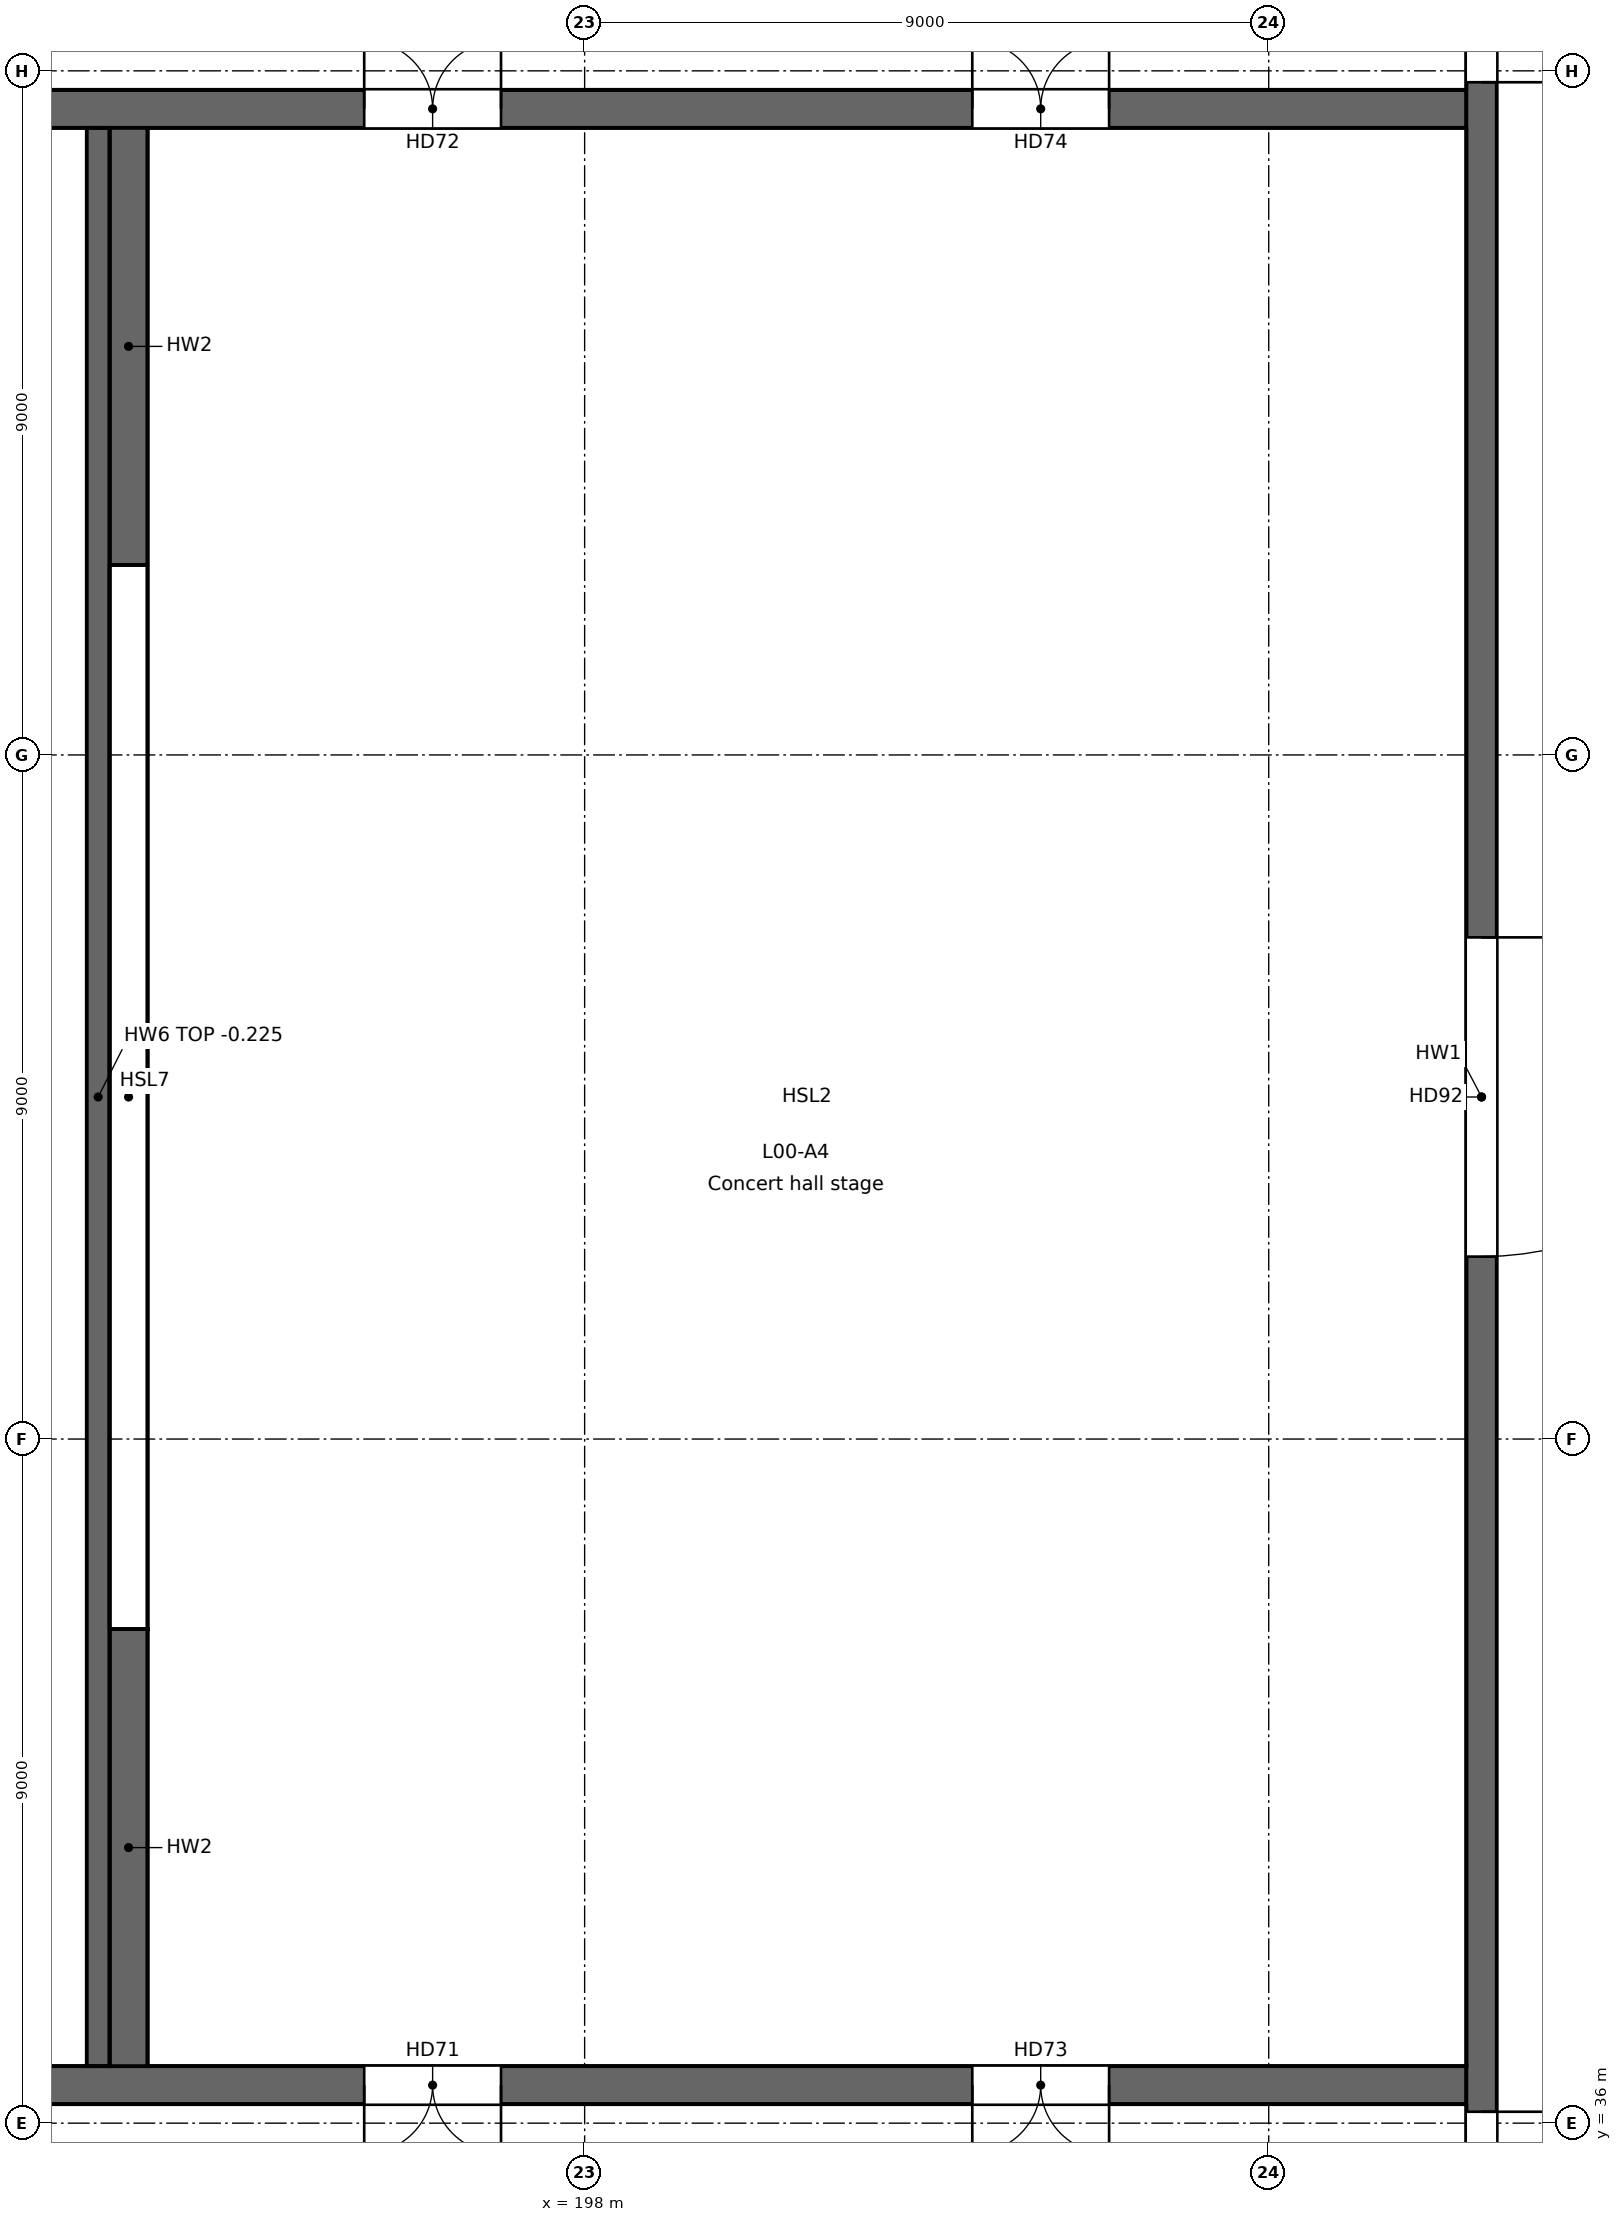
"""IFC4 building model, lengths in metres.
Left out: names, types, materials, properties, quantities, classifications, styles, units other than length and angle.
Written with IfcOpenShell. Run it as: python <this file> out.ifc"""

import sys

from ifc_helpers import new_model, si_unit, direction, frame, frame_2d, origin, place, context, subcontext, project, spatial, rectangle, extrude, element, fill, save


model = new_model("IFC4")
c1 = context("Model", 3, precision=1e-05, world=origin(), true_north=direction((0.0, 1.0)))
c2 = subcontext(c1, "Body", "Model", "MODEL_VIEW")
j1 = project(units=[si_unit("LENGTHUNIT", "METRE"), si_unit("PLANEANGLEUNIT", "RADIAN")], contexts=[c1])
p1 = place(None, origin())
s1 = spatial("IfcSite", under=j1, at=p1, CompositionType="ELEMENT")
p2 = place(p1, origin())
s2 = spatial("IfcBuilding", under=s1, at=p2, CompositionType="ELEMENT")
p3 = place(p2, origin())
s3 = spatial("IfcBuildingStorey", under=s2, at=p3, CompositionType="ELEMENT", Elevation=0.0)
p4 = place(p3, frame((209.6, 36.5, -1.8), z_axis=(0.0, 0.0, 1.0), x_axis=(-1.0, 0.0, 0.0)))
e1 = element("IfcWall", 1, at=p4, inside=s3, PredefinedType="SOLIDWALL", context=c2, shape_type="SweptSolid", body=[
    extrude(rectangle(XDim=47.35, YDim=0.5, at=frame_2d((23.675, 0.0))), origin(), (0.0, 0.0, 1.0), 7.45),
])
p5 = place(p4, frame((40.7, 0.0, 1.8)))
e2 = element("IfcOpeningElement", 2, at=p5, cuts=e1, PredefinedType="OPENING", context=c2, shape_type="SweptSolid", body=[
    extrude(rectangle(XDim=1.8, YDim=2.4, at=frame_2d((0.9, 1.2))), frame((0.0, 0.25, 0.0), z_axis=(0.0, -1.0, 0.0), x_axis=(1.0, 0.0, 0.0)), (0.0, 0.0, 1.0), 0.5),
])
p6 = place(p4, frame((37.2, 0.0, 1.8)))
e3 = element("IfcOpeningElement", 3, at=p6, cuts=e1, PredefinedType="OPENING", context=c2, shape_type="SweptSolid", body=[
    extrude(rectangle(XDim=1.8, YDim=2.4, at=frame_2d((0.9, 1.2))), frame((0.0, 0.25, 0.0), z_axis=(0.0, -1.0, 0.0), x_axis=(1.0, 0.0, 0.0)), (0.0, 0.0, 1.0), 0.5),
])
p7 = place(p4, frame((33.7, 0.0, 1.8)))
e4 = element("IfcOpeningElement", 4, at=p7, cuts=e1, PredefinedType="OPENING", context=c2, shape_type="SweptSolid", body=[
    extrude(rectangle(XDim=1.8, YDim=2.4, at=frame_2d((0.9, 1.2))), frame((0.0, 0.25, 0.0), z_axis=(0.0, -1.0, 0.0), x_axis=(1.0, 0.0, 0.0)), (0.0, 0.0, 1.0), 0.5),
])
p8 = place(p4, frame((12.7, 0.0, 1.8)))
e5 = element("IfcOpeningElement", 5, at=p8, cuts=e1, PredefinedType="OPENING", context=c2, shape_type="SweptSolid", body=[
    extrude(rectangle(XDim=1.8, YDim=2.1, at=frame_2d((0.9, 1.05))), frame((0.0, 0.25, 0.0), z_axis=(0.0, -1.0, 0.0), x_axis=(1.0, 0.0, 0.0)), (0.0, 0.0, 1.0), 0.5),
])
p9 = place(p4, frame((4.7, 0.0, 1.8)))
e6 = element("IfcOpeningElement", 6, at=p9, cuts=e1, PredefinedType="OPENING", context=c2, shape_type="SweptSolid", body=[
    extrude(rectangle(XDim=1.8, YDim=2.1, at=frame_2d((0.9, 1.05))), frame((0.0, 0.25, 0.0), z_axis=(0.0, -1.0, 0.0), x_axis=(1.0, 0.0, 0.0)), (0.0, 0.0, 1.0), 0.5),
])
p10 = place(p3, frame((162.25, 62.5, -1.8), z_axis=(0.0, 0.0, 1.0), x_axis=(1.0, 0.0, 0.0)))
e7 = element("IfcWall", 7, at=p10, inside=s3, PredefinedType="SOLIDWALL", context=c2, shape_type="SweptSolid", body=[
    extrude(rectangle(XDim=47.35, YDim=0.5, at=frame_2d((23.675, 0.0))), origin(), (0.0, 0.0, 1.0), 7.45),
])
p11 = place(p10, frame((4.85, 0.0, 1.8)))
e8 = element("IfcOpeningElement", 8, at=p11, cuts=e7, PredefinedType="OPENING", context=c2, shape_type="SweptSolid", body=[
    extrude(rectangle(XDim=1.8, YDim=2.4, at=frame_2d((0.9, 1.2))), frame((0.0, 0.25, 0.0), z_axis=(0.0, -1.0, 0.0), x_axis=(1.0, 0.0, 0.0)), (0.0, 0.0, 1.0), 0.5),
])
p12 = place(p10, frame((8.35, 0.0, 1.8)))
e9 = element("IfcOpeningElement", 9, at=p12, cuts=e7, PredefinedType="OPENING", context=c2, shape_type="SweptSolid", body=[
    extrude(rectangle(XDim=1.8, YDim=2.4, at=frame_2d((0.9, 1.2))), frame((0.0, 0.25, 0.0), z_axis=(0.0, -1.0, 0.0), x_axis=(1.0, 0.0, 0.0)), (0.0, 0.0, 1.0), 0.5),
])
p13 = place(p10, frame((11.85, 0.0, 1.8)))
e10 = element("IfcOpeningElement", 10, at=p13, cuts=e7, PredefinedType="OPENING", context=c2, shape_type="SweptSolid", body=[
    extrude(rectangle(XDim=1.8, YDim=2.4, at=frame_2d((0.9, 1.2))), frame((0.0, 0.25, 0.0), z_axis=(0.0, -1.0, 0.0), x_axis=(1.0, 0.0, 0.0)), (0.0, 0.0, 1.0), 0.5),
])
p14 = place(p10, frame((32.85, 0.0, 1.8)))
e11 = element("IfcOpeningElement", 11, at=p14, cuts=e7, PredefinedType="OPENING", context=c2, shape_type="SweptSolid", body=[
    extrude(rectangle(XDim=1.8, YDim=2.1, at=frame_2d((0.9, 1.05))), frame((0.0, 0.25, 0.0), z_axis=(0.0, -1.0, 0.0), x_axis=(1.0, 0.0, 0.0)), (0.0, 0.0, 1.0), 0.5),
])
p15 = place(p10, frame((40.85, 0.0, 1.8)))
e12 = element("IfcOpeningElement", 12, at=p15, cuts=e7, PredefinedType="OPENING", context=c2, shape_type="SweptSolid", body=[
    extrude(rectangle(XDim=1.8, YDim=2.1, at=frame_2d((0.9, 1.05))), frame((0.0, 0.25, 0.0), z_axis=(0.0, -1.0, 0.0), x_axis=(1.0, 0.0, 0.0)), (0.0, 0.0, 1.0), 0.5),
])
for number, where, z_axis, x_axis in (
    (13, (192.0, 36.75, -1.8), (0.0, 0.0, 1.0), (0.0, 1.0, 0.0)),
    (14, (192.0, 56.5, -1.8), (0.0, 0.0, 1.0), (0.0, 1.0, 0.0)),
):
    element("IfcWall", number, at=place(p3, frame(where, z_axis=z_axis, x_axis=x_axis)), inside=s3, PredefinedType="SOLIDWALL", context=c2, shape_type="SweptSolid", body=[
        extrude(rectangle(XDim=5.75, YDim=0.5, at=frame_2d((2.875, 0.0))), origin(), (0.0, 0.0, 1.0), 7.45),
    ])
p16 = place(p3, frame((209.8, 76.5, -1.8), z_axis=(0.0, 0.0, 1.0), x_axis=(0.0, -1.0, 0.0)))
e15 = element("IfcWall", 15, at=p16, inside=s3, PredefinedType="SOLIDWALL", context=c2, shape_type="SweptSolid", body=[
    extrude(rectangle(XDim=54.0, YDim=0.4, at=frame_2d((27.0, 0.0))), origin(), (0.0, 0.0, 1.0), 7.45),
])
p17 = place(p16, frame((43.725, 0.0, 1.8)))
e16 = element("IfcOpeningElement", 16, at=p17, cuts=e15, PredefinedType="OPENING", context=c2, shape_type="SweptSolid", body=[
    extrude(rectangle(XDim=2.0, YDim=2.1, at=frame_2d((1.0, 1.05))), frame((0.0, 0.2, 0.0), z_axis=(0.0, -1.0, 0.0), x_axis=(1.0, 0.0, 0.0)), (0.0, 0.0, 1.0), 0.4),
])
p18 = place(p16, frame((8.275, 0.0, 1.8)))
e17 = element("IfcOpeningElement", 17, at=p18, cuts=e15, PredefinedType="OPENING", context=c2, shape_type="SweptSolid", body=[
    extrude(rectangle(XDim=2.0, YDim=2.1, at=frame_2d((1.0, 1.05))), frame((0.0, 0.2, 0.0), z_axis=(0.0, -1.0, 0.0), x_axis=(1.0, 0.0, 0.0)), (0.0, 0.0, 1.0), 0.4),
])
p19 = place(p16, frame((40.35, 0.0, 1.8)))
e18 = element("IfcOpeningElement", 18, at=p19, cuts=e15, PredefinedType="OPENING", context=c2, shape_type="SweptSolid", body=[
    extrude(rectangle(XDim=2.0, YDim=2.1, at=frame_2d((1.0, 1.05))), frame((0.0, 0.2, 0.0), z_axis=(0.0, -1.0, 0.0), x_axis=(1.0, 0.0, 0.0)), (0.0, 0.0, 1.0), 0.4),
])
p20 = place(p16, frame((11.65, 0.0, 1.8)))
e19 = element("IfcOpeningElement", 19, at=p20, cuts=e15, PredefinedType="OPENING", context=c2, shape_type="SweptSolid", body=[
    extrude(rectangle(XDim=2.0, YDim=2.1, at=frame_2d((1.0, 1.05))), frame((0.0, 0.2, 0.0), z_axis=(0.0, -1.0, 0.0), x_axis=(1.0, 0.0, 0.0)), (0.0, 0.0, 1.0), 0.4),
])
p21 = place(p16, frame((24.9, 0.0, 1.8)))
e20 = element("IfcOpeningElement", 20, at=p21, cuts=e15, PredefinedType="OPENING", context=c2, shape_type="SweptSolid", body=[
    extrude(rectangle(XDim=4.2, YDim=4.2, at=frame_2d((2.1, 2.1))), frame((0.0, 0.2, 0.0), z_axis=(0.0, -1.0, 0.0), x_axis=(1.0, 0.0, 0.0)), (0.0, 0.0, 1.0), 0.4),
])
p22 = place(p16, frame((49.3, 0.0, 2.7)))
e21 = element("IfcOpeningElement", 21, at=p22, cuts=e15, PredefinedType="OPENING", context=c2, shape_type="SweptSolid", body=[
    extrude(rectangle(XDim=2.4, YDim=1.8, at=frame_2d((1.2, 0.9))), frame((0.0, 0.2, 0.0), z_axis=(0.0, -1.0, 0.0), x_axis=(1.0, 0.0, 0.0)), (0.0, 0.0, 1.0), 0.4),
])
p23 = place(p16, frame((2.3, 0.0, 2.7)))
e22 = element("IfcOpeningElement", 22, at=p23, cuts=e15, PredefinedType="OPENING", context=c2, shape_type="SweptSolid", body=[
    extrude(rectangle(XDim=2.4, YDim=1.8, at=frame_2d((1.2, 0.9))), frame((0.0, 0.2, 0.0), z_axis=(0.0, -1.0, 0.0), x_axis=(1.0, 0.0, 0.0)), (0.0, 0.0, 1.0), 0.4),
])
p24 = place(p3, frame((191.6, 36.75, -1.8), z_axis=(0.0, 0.0, 1.0), x_axis=(0.0, 1.0, 0.0)))
e23 = element("IfcWall", 23, at=p24, inside=s3, PredefinedType="SOLIDWALL", context=c2, shape_type="SweptSolid", body=[
    extrude(rectangle(XDim=25.5, YDim=0.3, at=frame_2d((12.75, 0.0))), origin(), (0.0, 0.0, 1.0), 1.575),
])
p25 = place(p8, origin())
e24 = element("IfcDoor", 24, at=p25, inside=s3, OperationType="DOUBLE_DOOR_SINGLE_SWING", PredefinedType="DOOR", context=c2, shape_type="SweptSolid", body=[
    extrude(rectangle(XDim=1.8, YDim=2.1, at=frame_2d((0.9, 1.05))), frame((0.0, 0.025, 0.0), z_axis=(0.0, -1.0, 0.0), x_axis=(1.0, 0.0, 0.0)), (0.0, 0.0, 1.0), 0.05),
])
fill(e5, e24)
p26 = place(p14, origin())
e25 = element("IfcDoor", 25, at=p26, inside=s3, OperationType="DOUBLE_DOOR_SINGLE_SWING", PredefinedType="DOOR", context=c2, shape_type="SweptSolid", body=[
    extrude(rectangle(XDim=1.8, YDim=2.1, at=frame_2d((0.9, 1.05))), frame((0.0, 0.025, 0.0), z_axis=(0.0, -1.0, 0.0), x_axis=(1.0, 0.0, 0.0)), (0.0, 0.0, 1.0), 0.05),
])
fill(e11, e25)
p27 = place(p9, origin())
e26 = element("IfcDoor", 26, at=p27, inside=s3, OperationType="DOUBLE_DOOR_SINGLE_SWING", PredefinedType="DOOR", context=c2, shape_type="SweptSolid", body=[
    extrude(rectangle(XDim=1.8, YDim=2.1, at=frame_2d((0.9, 1.05))), frame((0.0, 0.025, 0.0), z_axis=(0.0, -1.0, 0.0), x_axis=(1.0, 0.0, 0.0)), (0.0, 0.0, 1.0), 0.05),
])
fill(e6, e26)
p28 = place(p15, origin())
e27 = element("IfcDoor", 27, at=p28, inside=s3, OperationType="DOUBLE_DOOR_SINGLE_SWING", PredefinedType="DOOR", context=c2, shape_type="SweptSolid", body=[
    extrude(rectangle(XDim=1.8, YDim=2.1, at=frame_2d((0.9, 1.05))), frame((0.0, 0.025, 0.0), z_axis=(0.0, -1.0, 0.0), x_axis=(1.0, 0.0, 0.0)), (0.0, 0.0, 1.0), 0.05),
])
fill(e12, e27)
p29 = place(p19, origin())
e28 = element("IfcDoor", 28, at=p29, inside=s3, OperationType="DOUBLE_DOOR_SINGLE_SWING", PredefinedType="DOOR", context=c2, shape_type="SweptSolid", body=[
    extrude(rectangle(XDim=2.0, YDim=2.1, at=frame_2d((1.0, 1.05))), frame((0.0, 0.025, 0.0), z_axis=(0.0, -1.0, 0.0), x_axis=(1.0, 0.0, 0.0)), (0.0, 0.0, 1.0), 0.05),
])
fill(e18, e28)
p30 = place(p20, origin())
e29 = element("IfcDoor", 29, at=p30, inside=s3, OperationType="DOUBLE_DOOR_SINGLE_SWING", PredefinedType="DOOR", context=c2, shape_type="SweptSolid", body=[
    extrude(rectangle(XDim=2.0, YDim=2.1, at=frame_2d((1.0, 1.05))), frame((0.0, 0.025, 0.0), z_axis=(0.0, -1.0, 0.0), x_axis=(1.0, 0.0, 0.0)), (0.0, 0.0, 1.0), 0.05),
])
fill(e19, e29)
p31 = place(p21, origin())
e30 = element("IfcDoor", 30, at=p31, inside=s3, OperationType="ROLLINGUP", PredefinedType="DOOR", context=c2, shape_type="SweptSolid", body=[
    extrude(rectangle(XDim=4.2, YDim=4.2, at=frame_2d((2.1, 2.1))), frame((0.0, 0.025, 0.0), z_axis=(0.0, -1.0, 0.0), x_axis=(1.0, 0.0, 0.0)), (0.0, 0.0, 1.0), 0.05),
])
fill(e20, e30)
save(model, sys.argv[1])
